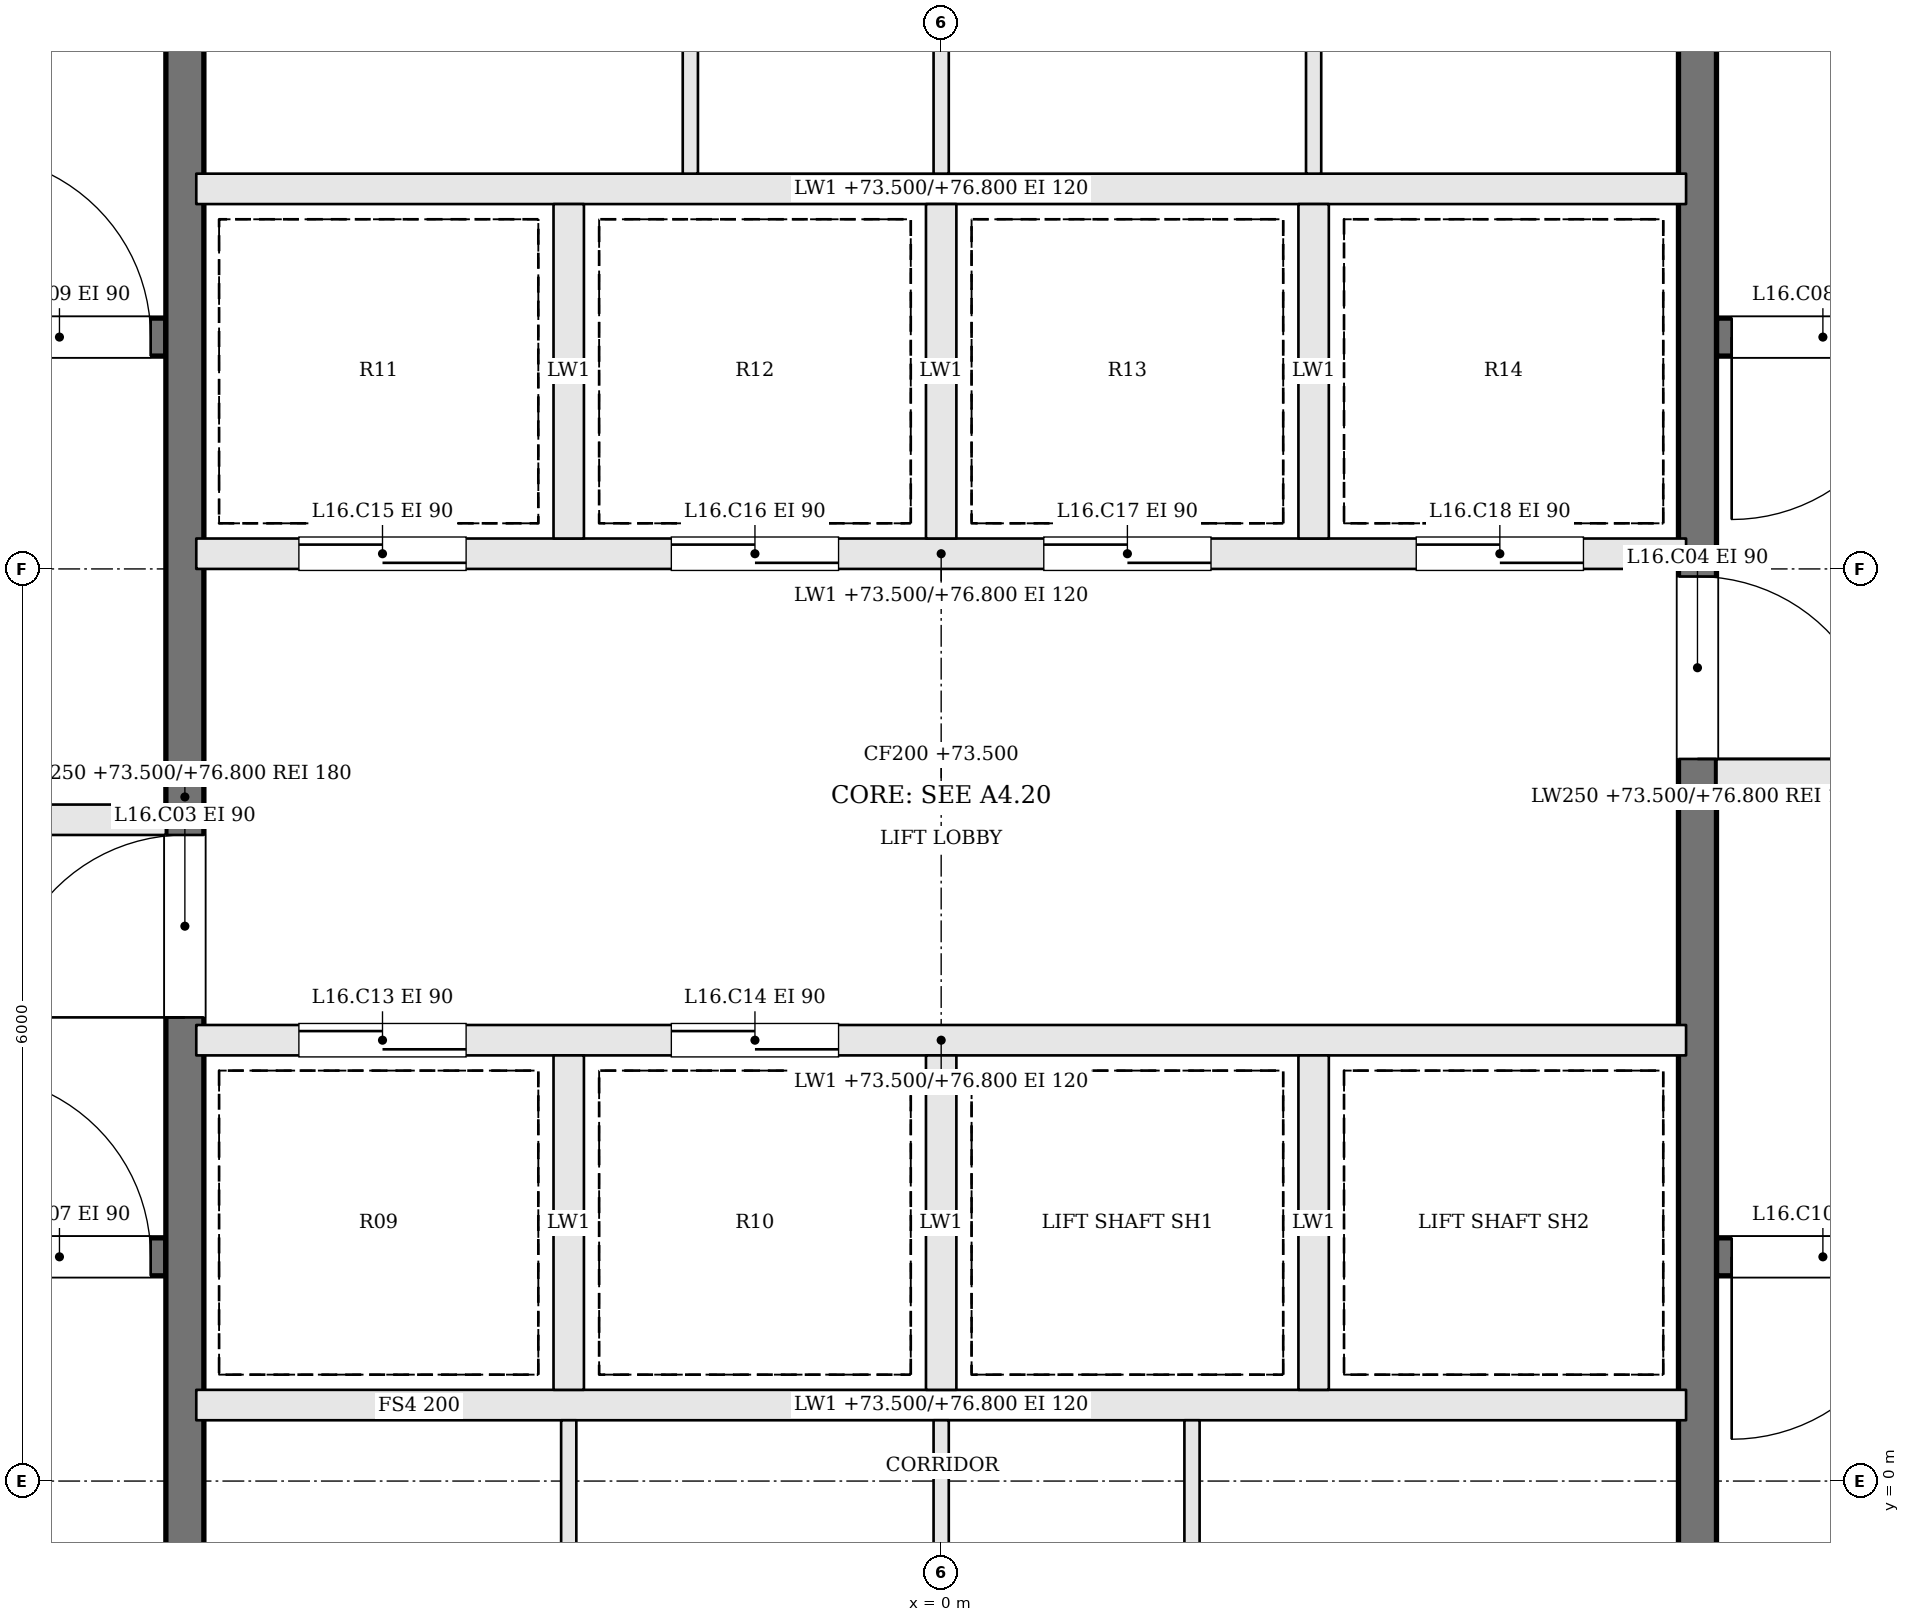
"""IFC4 building model, lengths in metres.
Left out: names, types, materials, properties, quantities, classifications, styles, units other than length and angle.
Written with IfcOpenShell. Run it as: python <this file> out.ifc"""

import sys

from ifc_helpers import new_model, si_unit, direction, frame, frame_2d, origin, place, context, subcontext, project, spatial, rectangle, extrude, element, fill, save


model = new_model("IFC4")
c1 = context("Model", 3, precision=1e-05, world=origin(), true_north=direction((0.0, 1.0)))
c2 = subcontext(c1, "Body", "Model", "MODEL_VIEW")
j1 = project(units=[si_unit("LENGTHUNIT", "METRE"), si_unit("PLANEANGLEUNIT", "RADIAN")], contexts=[c1])
p1 = place(None, origin())
s1 = spatial("IfcSite", under=j1, at=p1, CompositionType="ELEMENT")
p2 = place(p1, origin())
s2 = spatial("IfcBuilding", under=s1, at=p2, CompositionType="ELEMENT")
p3 = place(p2, frame((0.0, 0.0, 73.5)))
s3 = spatial("IfcBuildingStorey", under=s2, at=p3, CompositionType="ELEMENT", Elevation=73.5)
p4 = place(p3, frame((-11.6, 1.475, 0.0), z_axis=(0.0, 0.0, 1.0), x_axis=(1.0, 0.0, 0.0)))
e1 = element("IfcWall", 1, at=p4, inside=s3, PredefinedType="SOLIDWALL", context=c2, shape_type="SweptSolid", body=[
    extrude(rectangle(XDim=6.5, YDim=0.25, at=frame_2d((3.25, 0.0))), origin(), (0.0, 0.0, 1.0), 3.3),
])
p5 = place(p4, frame((5.2, 0.0, 0.0)))
e2 = element("IfcOpeningElement", 2, at=p5, cuts=e1, PredefinedType="OPENING", context=c2, shape_type="SweptSolid", body=[
    extrude(rectangle(XDim=1.2, YDim=2.1, at=frame_2d((0.6, 1.05))), frame((0.0, 0.135, 0.0), z_axis=(0.0, -1.0, 0.0), x_axis=(1.0, 0.0, 0.0)), (0.0, 0.0, 1.0), 0.27),
])
p6 = place(p3, frame((11.6, 7.525, 0.0), z_axis=(0.0, 0.0, 1.0), x_axis=(-1.0, 0.0, 0.0)))
e3 = element("IfcWall", 3, at=p6, inside=s3, PredefinedType="SOLIDWALL", context=c2, shape_type="SweptSolid", body=[
    extrude(rectangle(XDim=6.5, YDim=0.25, at=frame_2d((3.25, 0.0))), origin(), (0.0, 0.0, 1.0), 3.3),
])
p7 = place(p6, frame((5.2, 0.0, 0.0)))
e4 = element("IfcOpeningElement", 4, at=p7, cuts=e3, PredefinedType="OPENING", context=c2, shape_type="SweptSolid", body=[
    extrude(rectangle(XDim=1.2, YDim=2.1, at=frame_2d((0.6, 1.05))), frame((0.0, 0.135, 0.0), z_axis=(0.0, -1.0, 0.0), x_axis=(1.0, 0.0, 0.0)), (0.0, 0.0, 1.0), 0.27),
])
p8 = place(p3, frame((-11.6, 4.35, 0.0), z_axis=(0.0, 0.0, 1.0), x_axis=(1.0, 0.0, 0.0)))
e5 = element("IfcWall", 5, at=p8, inside=s3, PredefinedType="SOLIDWALL", context=c2, shape_type="SweptSolid", body=[
    extrude(rectangle(XDim=6.5, YDim=0.2, at=frame_2d((3.25, 0.0))), origin(), (0.0, 0.0, 1.0), 3.3),
])
p9 = place(p8, frame((3.8, 0.0, 0.0)))
e6 = element("IfcOpeningElement", 6, at=p9, cuts=e5, PredefinedType="OPENING", context=c2, shape_type="SweptSolid", body=[
    extrude(rectangle(XDim=1.2, YDim=2.1, at=frame_2d((0.6, 1.05))), frame((0.0, 0.11, 0.0), z_axis=(0.0, -1.0, 0.0), x_axis=(1.0, 0.0, 0.0)), (0.0, 0.0, 1.0), 0.22),
])
p10 = place(p8, frame((0.5, 0.0, 0.0)))
e7 = element("IfcOpeningElement", 7, at=p10, cuts=e5, PredefinedType="OPENING", context=c2, shape_type="SweptSolid", body=[
    extrude(rectangle(XDim=1.2, YDim=2.1, at=frame_2d((0.6, 1.05))), frame((0.0, 0.11, 0.0), z_axis=(0.0, -1.0, 0.0), x_axis=(1.0, 0.0, 0.0)), (0.0, 0.0, 1.0), 0.22),
])
p11 = place(p3, frame((11.6, 4.65, 0.0), z_axis=(0.0, 0.0, 1.0), x_axis=(-1.0, 0.0, 0.0)))
e8 = element("IfcWall", 8, at=p11, inside=s3, PredefinedType="SOLIDWALL", context=c2, shape_type="SweptSolid", body=[
    extrude(rectangle(XDim=6.5, YDim=0.2, at=frame_2d((3.25, 0.0))), origin(), (0.0, 0.0, 1.0), 3.3),
])
p12 = place(p11, frame((3.8, 0.0, 0.0)))
e9 = element("IfcOpeningElement", 9, at=p12, cuts=e8, PredefinedType="OPENING", context=c2, shape_type="SweptSolid", body=[
    extrude(rectangle(XDim=1.2, YDim=2.1, at=frame_2d((0.6, 1.05))), frame((0.0, 0.11, 0.0), z_axis=(0.0, -1.0, 0.0), x_axis=(1.0, 0.0, 0.0)), (0.0, 0.0, 1.0), 0.22),
])
p13 = place(p11, frame((0.5, 0.0, 0.0)))
e10 = element("IfcOpeningElement", 10, at=p13, cuts=e8, PredefinedType="OPENING", context=c2, shape_type="SweptSolid", body=[
    extrude(rectangle(XDim=1.2, YDim=2.1, at=frame_2d((0.6, 1.05))), frame((0.0, 0.11, 0.0), z_axis=(0.0, -1.0, 0.0), x_axis=(1.0, 0.0, 0.0)), (0.0, 0.0, 1.0), 0.22),
])
p14 = place(p3, frame((-11.6, 7.525, 0.0), z_axis=(0.0, 0.0, 1.0), x_axis=(1.0, 0.0, 0.0)))
e11 = element("IfcWall", 11, at=p14, inside=s3, PredefinedType="SOLIDWALL", context=c2, shape_type="SweptSolid", body=[
    extrude(rectangle(XDim=6.5, YDim=0.25, at=frame_2d((3.25, 0.0))), origin(), (0.0, 0.0, 1.0), 3.3),
])
p15 = place(p14, frame((5.2, 0.0, 0.0)))
e12 = element("IfcOpeningElement", 12, at=p15, cuts=e11, PredefinedType="OPENING", context=c2, shape_type="SweptSolid", body=[
    extrude(rectangle(XDim=1.2, YDim=2.1, at=frame_2d((0.6, 1.05))), frame((0.0, 0.135, 0.0), z_axis=(0.0, -1.0, 0.0), x_axis=(1.0, 0.0, 0.0)), (0.0, 0.0, 1.0), 0.27),
])
p16 = place(p3, frame((11.6, 1.475, 0.0), z_axis=(0.0, 0.0, 1.0), x_axis=(-1.0, 0.0, 0.0)))
e13 = element("IfcWall", 13, at=p16, inside=s3, PredefinedType="SOLIDWALL", context=c2, shape_type="SweptSolid", body=[
    extrude(rectangle(XDim=6.5, YDim=0.25, at=frame_2d((3.25, 0.0))), origin(), (0.0, 0.0, 1.0), 3.3),
])
p17 = place(p16, frame((5.2, 0.0, 0.0)))
e14 = element("IfcOpeningElement", 14, at=p17, cuts=e13, PredefinedType="OPENING", context=c2, shape_type="SweptSolid", body=[
    extrude(rectangle(XDim=1.2, YDim=2.1, at=frame_2d((0.6, 1.05))), frame((0.0, 0.135, 0.0), z_axis=(0.0, -1.0, 0.0), x_axis=(1.0, 0.0, 0.0)), (0.0, 0.0, 1.0), 0.27),
])
p18 = place(p3, frame((-4.975, -1.6, 0.0), z_axis=(0.0, 0.0, 1.0), x_axis=(0.0, 1.0, 0.0)))
e15 = element("IfcWall", 15, at=p18, inside=s3, PredefinedType="SOLIDWALL", context=c2, shape_type="SweptSolid", body=[
    extrude(rectangle(XDim=12.2, YDim=0.25, at=frame_2d((6.1, 0.0))), origin(), (0.0, 0.0, 1.0), 3.3),
])
p19 = place(p18, frame((4.65, 0.0, 0.0)))
e16 = element("IfcOpeningElement", 16, at=p19, cuts=e15, PredefinedType="OPENING", context=c2, shape_type="SweptSolid", body=[
    extrude(rectangle(XDim=1.2, YDim=2.1, at=frame_2d((0.6, 1.05))), frame((0.0, 0.135, 0.0), z_axis=(0.0, -1.0, 0.0), x_axis=(1.0, 0.0, 0.0)), (0.0, 0.0, 1.0), 0.27),
])
p20 = place(p3, frame((4.975, 10.6, 0.0), z_axis=(0.0, 0.0, 1.0), x_axis=(0.0, -1.0, 0.0)))
e17 = element("IfcWall", 17, at=p20, inside=s3, PredefinedType="SOLIDWALL", context=c2, shape_type="SweptSolid", body=[
    extrude(rectangle(XDim=12.2, YDim=0.25, at=frame_2d((6.1, 0.0))), origin(), (0.0, 0.0, 1.0), 3.3),
])
p21 = place(p20, frame((4.65, 0.0, 0.0)))
e18 = element("IfcOpeningElement", 18, at=p21, cuts=e17, PredefinedType="OPENING", context=c2, shape_type="SweptSolid", body=[
    extrude(rectangle(XDim=1.2, YDim=2.1, at=frame_2d((0.6, 1.05))), frame((0.0, 0.135, 0.0), z_axis=(0.0, -1.0, 0.0), x_axis=(1.0, 0.0, 0.0)), (0.0, 0.0, 1.0), 0.27),
])
p22 = place(p3, frame((-4.9, 0.5, 0.0), z_axis=(0.0, 0.0, 1.0), x_axis=(1.0, 0.0, 0.0)))
e19 = element("IfcWall", 19, at=p22, inside=s3, PredefinedType="SOLIDWALL", context=c2, shape_type="SweptSolid", body=[
    extrude(rectangle(XDim=9.8, YDim=0.2, at=frame_2d((4.9, 0.0))), origin(), (0.0, 0.0, 1.0), 3.3),
])
p23 = place(p3, frame((-4.9, 2.9, 0.0), z_axis=(0.0, 0.0, 1.0), x_axis=(1.0, 0.0, 0.0)))
e20 = element("IfcWall", 20, at=p23, inside=s3, PredefinedType="SOLIDWALL", context=c2, shape_type="SweptSolid", body=[
    extrude(rectangle(XDim=9.8, YDim=0.2, at=frame_2d((4.9, 0.0))), origin(), (0.0, 0.0, 1.0), 3.3),
])
p24 = place(p23, frame((0.675, 0.0, 0.0)))
e21 = element("IfcOpeningElement", 21, at=p24, cuts=e20, PredefinedType="OPENING", context=c2, shape_type="SweptSolid", body=[
    extrude(rectangle(XDim=1.1, YDim=2.1, at=frame_2d((0.55, 1.05))), frame((0.0, 0.11, 0.0), z_axis=(0.0, -1.0, 0.0), x_axis=(1.0, 0.0, 0.0)), (0.0, 0.0, 1.0), 0.22),
])
p25 = place(p23, frame((3.125, 0.0, 0.0)))
e22 = element("IfcOpeningElement", 22, at=p25, cuts=e20, PredefinedType="OPENING", context=c2, shape_type="SweptSolid", body=[
    extrude(rectangle(XDim=1.1, YDim=2.1, at=frame_2d((0.55, 1.05))), frame((0.0, 0.11, 0.0), z_axis=(0.0, -1.0, 0.0), x_axis=(1.0, 0.0, 0.0)), (0.0, 0.0, 1.0), 0.22),
])
p26 = place(p3, frame((-4.9, 6.1, 0.0), z_axis=(0.0, 0.0, 1.0), x_axis=(1.0, 0.0, 0.0)))
e23 = element("IfcWall", 23, at=p26, inside=s3, PredefinedType="SOLIDWALL", context=c2, shape_type="SweptSolid", body=[
    extrude(rectangle(XDim=9.8, YDim=0.2, at=frame_2d((4.9, 0.0))), origin(), (0.0, 0.0, 1.0), 3.3),
])
p27 = place(p26, frame((0.675, 0.0, 0.0)))
e24 = element("IfcOpeningElement", 24, at=p27, cuts=e23, PredefinedType="OPENING", context=c2, shape_type="SweptSolid", body=[
    extrude(rectangle(XDim=1.1, YDim=2.1, at=frame_2d((0.55, 1.05))), frame((0.0, 0.11, 0.0), z_axis=(0.0, -1.0, 0.0), x_axis=(1.0, 0.0, 0.0)), (0.0, 0.0, 1.0), 0.22),
])
p28 = place(p26, frame((3.125, 0.0, 0.0)))
e25 = element("IfcOpeningElement", 25, at=p28, cuts=e23, PredefinedType="OPENING", context=c2, shape_type="SweptSolid", body=[
    extrude(rectangle(XDim=1.1, YDim=2.1, at=frame_2d((0.55, 1.05))), frame((0.0, 0.11, 0.0), z_axis=(0.0, -1.0, 0.0), x_axis=(1.0, 0.0, 0.0)), (0.0, 0.0, 1.0), 0.22),
])
p29 = place(p26, frame((5.575, 0.0, 0.0)))
e26 = element("IfcOpeningElement", 26, at=p29, cuts=e23, PredefinedType="OPENING", context=c2, shape_type="SweptSolid", body=[
    extrude(rectangle(XDim=1.1, YDim=2.1, at=frame_2d((0.55, 1.05))), frame((0.0, 0.11, 0.0), z_axis=(0.0, -1.0, 0.0), x_axis=(1.0, 0.0, 0.0)), (0.0, 0.0, 1.0), 0.22),
])
p30 = place(p26, frame((8.025, 0.0, 0.0)))
e27 = element("IfcOpeningElement", 27, at=p30, cuts=e23, PredefinedType="OPENING", context=c2, shape_type="SweptSolid", body=[
    extrude(rectangle(XDim=1.1, YDim=2.1, at=frame_2d((0.55, 1.05))), frame((0.0, 0.11, 0.0), z_axis=(0.0, -1.0, 0.0), x_axis=(1.0, 0.0, 0.0)), (0.0, 0.0, 1.0), 0.22),
])
p31 = place(p3, frame((-4.9, 8.5, 0.0), z_axis=(0.0, 0.0, 1.0), x_axis=(1.0, 0.0, 0.0)))
e28 = element("IfcWall", 28, at=p31, inside=s3, PredefinedType="SOLIDWALL", context=c2, shape_type="SweptSolid", body=[
    extrude(rectangle(XDim=9.8, YDim=0.2, at=frame_2d((4.9, 0.0))), origin(), (0.0, 0.0, 1.0), 3.3),
])
for number, where, z_axis, x_axis in (
    (29, (-2.45, 0.6, 0.0), (0.0, 0.0, 1.0), (0.0, 1.0, 0.0)),
    (30, (0.0, 0.6, 0.0), (0.0, 0.0, 1.0), (0.0, 1.0, 0.0)),
    (31, (2.45, 0.6, 0.0), (0.0, 0.0, 1.0), (0.0, 1.0, 0.0)),
    (32, (-2.45, 6.2, 0.0), (0.0, 0.0, 1.0), (0.0, 1.0, 0.0)),
    (33, (0.0, 6.2, 0.0), (0.0, 0.0, 1.0), (0.0, 1.0, 0.0)),
    (34, (2.45, 6.2, 0.0), (0.0, 0.0, 1.0), (0.0, 1.0, 0.0)),
):
    element("IfcWall", number, at=place(p3, frame(where, z_axis=z_axis, x_axis=x_axis)), inside=s3, PredefinedType="SOLIDWALL", context=c2, shape_type="SweptSolid", body=[
        extrude(rectangle(XDim=2.2, YDim=0.2, at=frame_2d((1.1, 0.0))), origin(), (0.0, 0.0, 1.0), 3.3),
    ])
for number, where, z_axis, x_axis in (
    (35, (-2.45, -1.6, 0.0), (0.0, 0.0, 1.0), (0.0, 1.0, 0.0)),
    (36, (0.0, -1.6, 0.0), (0.0, 0.0, 1.0), (0.0, 1.0, 0.0)),
    (37, (1.65, -1.6, 0.0), (0.0, 0.0, 1.0), (0.0, 1.0, 0.0)),
    (38, (-1.65, 8.6, 0.0), (0.0, 0.0, 1.0), (0.0, 1.0, 0.0)),
    (39, (0.0, 8.6, 0.0), (0.0, 0.0, 1.0), (0.0, 1.0, 0.0)),
    (40, (2.45, 8.6, 0.0), (0.0, 0.0, 1.0), (0.0, 1.0, 0.0)),
):
    element("IfcWall", number, at=place(p3, frame(where, z_axis=z_axis, x_axis=x_axis)), inside=s3, PredefinedType="PARTITIONING", context=c2, shape_type="SweptSolid", body=[
        extrude(rectangle(XDim=2.0, YDim=0.1, at=frame_2d((1.0, 0.0))), origin(), (0.0, 0.0, 1.0), 3.3),
    ])
p32 = place(p19, origin())
e41 = element("IfcDoor", 41, at=p32, inside=s3, OperationType="SINGLE_SWING_LEFT", PredefinedType="DOOR", context=c2, shape_type="SweptSolid", body=[
    extrude(rectangle(XDim=1.2, YDim=2.1, at=frame_2d((0.6, 1.05))), frame((0.0, 0.025, 0.0), z_axis=(0.0, -1.0, 0.0), x_axis=(1.0, 0.0, 0.0)), (0.0, 0.0, 1.0), 0.05),
])
fill(e16, e41)
p33 = place(p21, origin())
e42 = element("IfcDoor", 42, at=p33, inside=s3, OperationType="SINGLE_SWING_RIGHT", PredefinedType="DOOR", context=c2, shape_type="SweptSolid", body=[
    extrude(rectangle(XDim=1.2, YDim=2.1, at=frame_2d((0.6, 1.05))), frame((0.0, 0.025, 0.0), z_axis=(0.0, -1.0, 0.0), x_axis=(1.0, 0.0, 0.0)), (0.0, 0.0, 1.0), 0.05),
])
fill(e18, e42)
p34 = place(p5, origin())
e43 = element("IfcDoor", 43, at=p34, inside=s3, OperationType="SINGLE_SWING_LEFT", PredefinedType="DOOR", context=c2, shape_type="SweptSolid", body=[
    extrude(rectangle(XDim=1.2, YDim=2.1, at=frame_2d((0.6, 1.05))), frame((0.0, 0.025, 0.0), z_axis=(0.0, -1.0, 0.0), x_axis=(1.0, 0.0, 0.0)), (0.0, 0.0, 1.0), 0.05),
])
fill(e2, e43)
p35 = place(p7, origin())
e44 = element("IfcDoor", 44, at=p35, inside=s3, OperationType="SINGLE_SWING_RIGHT", PredefinedType="DOOR", context=c2, shape_type="SweptSolid", body=[
    extrude(rectangle(XDim=1.2, YDim=2.1, at=frame_2d((0.6, 1.05))), frame((0.0, 0.025, 0.0), z_axis=(0.0, -1.0, 0.0), x_axis=(1.0, 0.0, 0.0)), (0.0, 0.0, 1.0), 0.05),
])
fill(e4, e44)
p36 = place(p15, origin())
e45 = element("IfcDoor", 45, at=p36, inside=s3, OperationType="SINGLE_SWING_LEFT", PredefinedType="DOOR", context=c2, shape_type="SweptSolid", body=[
    extrude(rectangle(XDim=1.2, YDim=2.1, at=frame_2d((0.6, 1.05))), frame((0.0, 0.025, 0.0), z_axis=(0.0, -1.0, 0.0), x_axis=(1.0, 0.0, 0.0)), (0.0, 0.0, 1.0), 0.05),
])
fill(e12, e45)
p37 = place(p17, origin())
e46 = element("IfcDoor", 46, at=p37, inside=s3, OperationType="SINGLE_SWING_RIGHT", PredefinedType="DOOR", context=c2, shape_type="SweptSolid", body=[
    extrude(rectangle(XDim=1.2, YDim=2.1, at=frame_2d((0.6, 1.05))), frame((0.0, 0.025, 0.0), z_axis=(0.0, -1.0, 0.0), x_axis=(1.0, 0.0, 0.0)), (0.0, 0.0, 1.0), 0.05),
])
fill(e14, e46)
p38 = place(p24, origin())
e47 = element("IfcDoor", 47, at=p38, inside=s3, OperationType="SLIDING_TO_RIGHT", PredefinedType="DOOR", context=c2, shape_type="SweptSolid", body=[
    extrude(rectangle(XDim=1.1, YDim=2.1, at=frame_2d((0.55, 1.05))), frame((0.0, 0.025, 0.0), z_axis=(0.0, -1.0, 0.0), x_axis=(1.0, 0.0, 0.0)), (0.0, 0.0, 1.0), 0.05),
])
fill(e21, e47)
p39 = place(p25, origin())
e48 = element("IfcDoor", 48, at=p39, inside=s3, OperationType="SLIDING_TO_LEFT", PredefinedType="DOOR", context=c2, shape_type="SweptSolid", body=[
    extrude(rectangle(XDim=1.1, YDim=2.1, at=frame_2d((0.55, 1.05))), frame((0.0, 0.025, 0.0), z_axis=(0.0, -1.0, 0.0), x_axis=(1.0, 0.0, 0.0)), (0.0, 0.0, 1.0), 0.05),
])
fill(e22, e48)
p40 = place(p27, origin())
e49 = element("IfcDoor", 49, at=p40, inside=s3, OperationType="SLIDING_TO_RIGHT", PredefinedType="DOOR", context=c2, shape_type="SweptSolid", body=[
    extrude(rectangle(XDim=1.1, YDim=2.1, at=frame_2d((0.55, 1.05))), frame((0.0, 0.025, 0.0), z_axis=(0.0, -1.0, 0.0), x_axis=(1.0, 0.0, 0.0)), (0.0, 0.0, 1.0), 0.05),
])
fill(e24, e49)
p41 = place(p28, origin())
e50 = element("IfcDoor", 50, at=p41, inside=s3, OperationType="SLIDING_TO_LEFT", PredefinedType="DOOR", context=c2, shape_type="SweptSolid", body=[
    extrude(rectangle(XDim=1.1, YDim=2.1, at=frame_2d((0.55, 1.05))), frame((0.0, 0.025, 0.0), z_axis=(0.0, -1.0, 0.0), x_axis=(1.0, 0.0, 0.0)), (0.0, 0.0, 1.0), 0.05),
])
fill(e25, e50)
p42 = place(p29, origin())
e51 = element("IfcDoor", 51, at=p42, inside=s3, OperationType="SLIDING_TO_RIGHT", PredefinedType="DOOR", context=c2, shape_type="SweptSolid", body=[
    extrude(rectangle(XDim=1.1, YDim=2.1, at=frame_2d((0.55, 1.05))), frame((0.0, 0.025, 0.0), z_axis=(0.0, -1.0, 0.0), x_axis=(1.0, 0.0, 0.0)), (0.0, 0.0, 1.0), 0.05),
])
fill(e26, e51)
p43 = place(p30, origin())
e52 = element("IfcDoor", 52, at=p43, inside=s3, OperationType="SLIDING_TO_LEFT", PredefinedType="DOOR", context=c2, shape_type="SweptSolid", body=[
    extrude(rectangle(XDim=1.1, YDim=2.1, at=frame_2d((0.55, 1.05))), frame((0.0, 0.025, 0.0), z_axis=(0.0, -1.0, 0.0), x_axis=(1.0, 0.0, 0.0)), (0.0, 0.0, 1.0), 0.05),
])
fill(e27, e52)
save(model, sys.argv[1])
